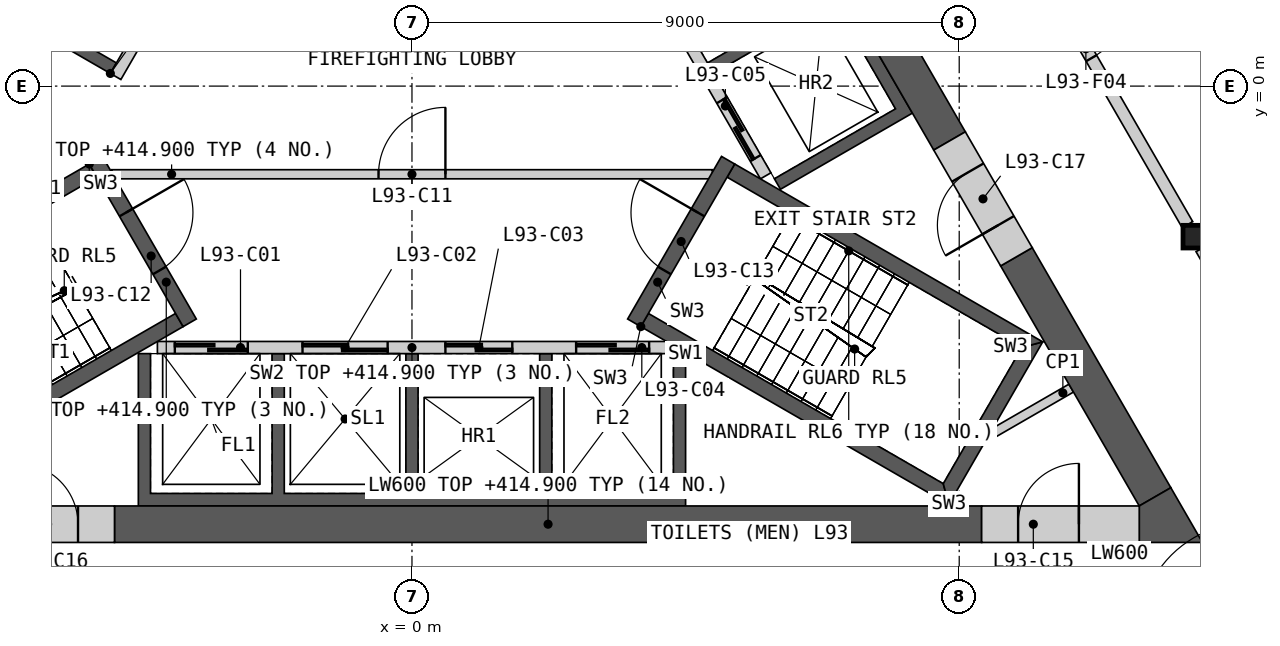
"""IFC4 building model, lengths in metres.
Left out: names, types, materials, properties, quantities, classifications, styles, units other than length and angle.
Written with IfcOpenShell. Run it as: python <this file> out.ifc"""

import sys

from ifc_helpers import new_model, si_unit, direction, frame, frame_2d, origin, origin_2d, place, context, subcontext, project, spatial, polyline, rectangle, i_section, outline, extrude, element, fill, save


model = new_model("IFC4")
c1 = context("Model", 3, precision=1e-05, world=origin(), true_north=direction((0.0, 1.0)))
c2 = subcontext(c1, "Body", "Model", "MODEL_VIEW")
j1 = project(units=[si_unit("LENGTHUNIT", "METRE"), si_unit("PLANEANGLEUNIT", "RADIAN")], contexts=[c1])
p1 = place(None, origin())
s1 = spatial("IfcSite", under=j1, at=p1, CompositionType="ELEMENT")
p2 = place(p1, origin())
s2 = spatial("IfcBuilding", under=s1, at=p2, CompositionType="ELEMENT")
p3 = place(p2, frame((0.0, 0.0, 405.2)))
s3 = spatial("IfcBuildingStorey", under=s2, at=p3, CompositionType="ELEMENT", Elevation=405.2)
p4 = place(p3, frame((12.868, -2.476, 0.0), z_axis=(0.0, 0.0, 1.0), x_axis=(1.0, 0.0, 0.0)))
e1 = element("IfcColumn", 1, at=p4, inside=s3, PredefinedType="COLUMN", context=c2, shape_type="SweptSolid", body=[
    extrude(i_section(OverallWidth=0.374, OverallDepth=0.372, WebThickness=0.016, FlangeThickness=0.026, at=origin_2d()), origin(), (0.0, 0.0, 1.0), 10.0),
])
p5 = place(p3, origin())
e2 = element("IfcWall", 2, at=p5, inside=s3, PredefinedType="SHEAR", context=c2, shape_type="SweptSolid", body=[
    extrude(outline(polyline([(4.5, -4.4), (4.5, -6.906), (-4.5, -6.906), (-4.5, -4.4), (-4.3, -4.4), (-4.3, -6.7), (-2.3, -6.7), (-2.3, -4.4), (-2.1, -4.4), (-2.1, -6.7), (-0.1, -6.7), (-0.1, -4.4), (0.1, -4.4), (0.1, -6.7), (2.1, -6.7), (2.1, -4.4), (2.3, -4.4), (2.3, -6.7), (4.3, -6.7), (4.3, -4.4), (4.5, -4.4)])), origin(), (0.0, 0.0, 1.0), 9.7),
])
p6 = place(p3, frame((-4.187, -4.3, 0.0), z_axis=(0.0, 0.0, 1.0), x_axis=(1.0, 0.0, 0.0)))
e3 = element("IfcWall", 3, at=p6, inside=s3, PredefinedType="SOLIDWALL", context=c2, shape_type="SweptSolid", body=[
    extrude(rectangle(XDim=8.373, YDim=0.2, at=frame_2d((4.187, 0.0))), origin(), (0.0, 0.0, 1.0), 9.7),
])
p7 = place(p6, frame((0.287, 0.0, 0.0)))
e4 = element("IfcOpeningElement", 4, at=p7, cuts=e3, PredefinedType="OPENING", context=c2, shape_type="SweptSolid", body=[
    extrude(rectangle(XDim=1.2, YDim=2.1, at=frame_2d((0.6, 1.05))), frame((0.0, 0.11, 0.0), z_axis=(0.0, -1.0, 0.0), x_axis=(1.0, 0.0, 0.0)), (0.0, 0.0, 1.0), 0.22),
])
p8 = place(p6, frame((2.387, 0.0, 0.0)))
e5 = element("IfcOpeningElement", 5, at=p8, cuts=e3, PredefinedType="OPENING", context=c2, shape_type="SweptSolid", body=[
    extrude(rectangle(XDim=1.4, YDim=2.1, at=frame_2d((0.7, 1.05))), frame((0.0, 0.11, 0.0), z_axis=(0.0, -1.0, 0.0), x_axis=(1.0, 0.0, 0.0)), (0.0, 0.0, 1.0), 0.22),
])
p9 = place(p6, frame((4.737, 0.0, 0.0)))
e6 = element("IfcOpeningElement", 6, at=p9, cuts=e3, PredefinedType="OPENING", context=c2, shape_type="SweptSolid", body=[
    extrude(rectangle(XDim=1.1, YDim=2.1, at=frame_2d((0.55, 1.05))), frame((0.0, 0.11, 0.0), z_axis=(0.0, -1.0, 0.0), x_axis=(1.0, 0.0, 0.0)), (0.0, 0.0, 1.0), 0.22),
])
p10 = place(p6, frame((6.887, 0.0, 0.0)))
e7 = element("IfcOpeningElement", 7, at=p10, cuts=e3, PredefinedType="OPENING", context=c2, shape_type="SweptSolid", body=[
    extrude(rectangle(XDim=1.2, YDim=2.1, at=frame_2d((0.6, 1.05))), frame((0.0, 0.11, 0.0), z_axis=(0.0, -1.0, 0.0), x_axis=(1.0, 0.0, 0.0)), (0.0, 0.0, 1.0), 0.22),
])
p11 = place(p3, origin())
e8 = element("IfcWall", 8, at=p11, inside=s3, PredefinedType="SHEAR", context=c2, shape_type="SweptSolid", body=[
    extrude(outline(polyline([(1.561, 6.097), (3.731, 7.35), (8.231, -0.444), (6.061, -1.697), (5.96, -1.524), (7.952, -0.374), (6.952, 1.358), (4.96, 0.208), (4.861, 0.381), (6.852, 1.531), (5.852, 3.263), (3.861, 2.113), (3.76, 2.287), (5.752, 3.437), (4.752, 5.169), (2.76, 4.019), (2.66, 4.192), (4.652, 5.342), (3.652, 7.074), (1.66, 5.924), (1.561, 6.097)])), origin(), (0.0, 0.0, 1.0), 9.7),
])
p12 = place(p3, frame((5.817, -1.476, 0.0), z_axis=(0.0, 0.0, 1.0), x_axis=(-0.500002616675, 0.866023893041, 0.0)))
e9 = element("IfcWall", 9, at=p12, inside=s3, PredefinedType="SOLIDWALL", context=c2, shape_type="SweptSolid", body=[
    extrude(rectangle(XDim=8.373, YDim=0.2, at=frame_2d((4.187, 0.0))), origin(), (0.0, 0.0, 1.0), 9.7),
])
p13 = place(p12, frame((0.337, 0.0, 0.0)))
e10 = element("IfcOpeningElement", 10, at=p13, cuts=e9, PredefinedType="OPENING", context=c2, shape_type="SweptSolid", body=[
    extrude(rectangle(XDim=1.1, YDim=2.1, at=frame_2d((0.55, 1.05))), frame((0.0, 0.11, 0.0), z_axis=(0.0, -1.0, 0.0), x_axis=(1.0, 0.0, 0.0)), (0.0, 0.0, 1.0), 0.22),
])
p14 = place(p12, frame((2.537, 0.0, 0.0)))
e11 = element("IfcOpeningElement", 11, at=p14, cuts=e9, PredefinedType="OPENING", context=c2, shape_type="SweptSolid", body=[
    extrude(rectangle(XDim=1.1, YDim=2.1, at=frame_2d((0.55, 1.05))), frame((0.0, 0.11, 0.0), z_axis=(0.0, -1.0, 0.0), x_axis=(1.0, 0.0, 0.0)), (0.0, 0.0, 1.0), 0.22),
])
p15 = place(p12, frame((4.737, 0.0, 0.0)))
e12 = element("IfcOpeningElement", 12, at=p15, cuts=e9, PredefinedType="OPENING", context=c2, shape_type="SweptSolid", body=[
    extrude(rectangle(XDim=1.1, YDim=2.1, at=frame_2d((0.55, 1.05))), frame((0.0, 0.11, 0.0), z_axis=(0.0, -1.0, 0.0), x_axis=(1.0, 0.0, 0.0)), (0.0, 0.0, 1.0), 0.22),
])
p16 = place(p12, frame((7.037, 0.0, 0.0)))
e13 = element("IfcOpeningElement", 13, at=p16, cuts=e9, PredefinedType="OPENING", context=c2, shape_type="SweptSolid", body=[
    extrude(rectangle(XDim=0.9, YDim=2.1, at=frame_2d((0.45, 1.05))), frame((0.0, 0.11, 0.0), z_axis=(0.0, -1.0, 0.0), x_axis=(1.0, 0.0, 0.0)), (0.0, 0.0, 1.0), 0.22),
])
p17 = place(p3, origin())
e14 = element("IfcWall", 14, at=p17, inside=s3, PredefinedType="SHEAR", context=c2, shape_type="SweptSolid", body=[
    extrude(outline(polyline([(-4.96, 0.208), (-7.131, 1.461), (-3.731, 7.35), (-1.561, 6.097), (-1.66, 5.924), (-3.652, 7.074), (-4.652, 5.342), (-2.66, 4.192), (-2.76, 4.019), (-4.752, 5.169), (-6.852, 1.531), (-4.861, 0.381), (-4.96, 0.208)])), origin(), (0.0, 0.0, 1.0), 9.7),
])
p18 = place(p3, frame((-1.631, 5.776, 0.0), z_axis=(0.0, 0.0, 1.0), x_axis=(-0.499992876559, -0.866029516466, 0.0)))
e15 = element("IfcWall", 15, at=p18, inside=s3, PredefinedType="SOLIDWALL", context=c2, shape_type="SweptSolid", body=[
    extrude(rectangle(XDim=6.486, YDim=0.2, at=frame_2d((3.243, 0.0))), origin(), (0.0, 0.0, 1.0), 9.7),
])
p19 = place(p18, frame((0.437, 0.0, 0.0)))
e16 = element("IfcOpeningElement", 16, at=p19, cuts=e15, PredefinedType="OPENING", context=c2, shape_type="SweptSolid", body=[
    extrude(rectangle(XDim=0.9, YDim=2.1, at=frame_2d((0.45, 1.05))), frame((0.0, 0.11, 0.0), z_axis=(0.0, -1.0, 0.0), x_axis=(1.0, 0.0, 0.0)), (0.0, 0.0, 1.0), 0.22),
])
p20 = place(p18, frame((3.737, 0.0, 0.0)))
e17 = element("IfcOpeningElement", 17, at=p20, cuts=e15, PredefinedType="OPENING", context=c2, shape_type="SweptSolid", body=[
    extrude(rectangle(XDim=0.9, YDim=2.1, at=frame_2d((0.45, 1.05))), frame((0.0, 0.11, 0.0), z_axis=(0.0, -1.0, 0.0), x_axis=(1.0, 0.0, 0.0)), (0.0, 0.0, 1.0), 0.22),
])
p21 = place(p3, frame((-4.941, -1.45, 0.0), z_axis=(0.0, 0.0, 1.0), x_axis=(1.0, 0.0, 0.0)))
e18 = element("IfcWall", 18, at=p21, inside=s3, PredefinedType="PARTITIONING", context=c2, shape_type="SweptSolid", body=[
    extrude(rectangle(XDim=9.882, YDim=0.15, at=frame_2d((4.941, 0.0))), origin(), (0.0, 0.0, 1.0), 9.7),
])
p22 = place(p21, frame((4.391, 0.0, 0.0)))
e19 = element("IfcOpeningElement", 19, at=p22, cuts=e18, PredefinedType="OPENING", context=c2, shape_type="SweptSolid", body=[
    extrude(rectangle(XDim=1.1, YDim=2.1, at=frame_2d((0.55, 1.05))), frame((0.0, 0.085, 0.0), z_axis=(0.0, -1.0, 0.0), x_axis=(1.0, 0.0, 0.0)), (0.0, 0.0, 1.0), 0.17),
])
p23 = place(p3, origin())
e20 = element("IfcWall", 20, at=p23, inside=s3, PredefinedType="SHEAR", context=c2, shape_type="SweptSolid", body=[
    extrude(outline(polyline([(-5.307, -1.281), (-10.374, -4.206), (-10.032, -4.298), (-5.182, -1.498), (-5.307, -1.281)])), origin(), (0.0, 0.0, 1.0), 9.7),
])
p24 = place(p3, origin())
e21 = element("IfcWall", 21, at=p24, inside=s3, PredefinedType="SHEAR", context=c2, shape_type="SweptSolid", body=[
    extrude(outline(polyline([(-8.738, -6.539), (-8.83, -6.881), (-3.763, -3.956), (-3.888, -3.739), (-8.738, -6.539)])), origin(), (0.0, 0.0, 1.0), 9.7),
])
p25 = place(p3, frame((-5.199, -1.219, 0.0), z_axis=(0.0, 0.0, 1.0), x_axis=(0.499982516597, -0.866035497597, 0.0)))
e22 = element("IfcWall", 22, at=p25, inside=s3, PredefinedType="SHEAR", context=c2, shape_type="SweptSolid", body=[
    extrude(rectangle(XDim=3.088, YDim=0.25, at=frame_2d((1.544, 0.0))), origin(), (0.0, 0.0, 1.0), 9.7),
])
p26 = place(p25, frame((0.994, 0.0, 0.0)))
e23 = element("IfcOpeningElement", 23, at=p26, cuts=e22, PredefinedType="OPENING", context=c2, shape_type="SweptSolid", body=[
    extrude(rectangle(XDim=1.1, YDim=2.1, at=frame_2d((0.55, 1.05))), frame((0.0, 0.135, 0.0), z_axis=(0.0, -1.0, 0.0), x_axis=(1.0, 0.0, 0.0)), (0.0, 0.0, 1.0), 0.27),
])
p27 = place(p3, origin())
e24 = element("IfcWall", 24, at=p27, inside=s3, PredefinedType="SHEAR", context=c2, shape_type="SweptSolid", body=[
    extrude(outline(polyline([(3.763, -3.956), (8.83, -6.881), (8.738, -6.539), (3.888, -3.739), (3.763, -3.956)])), origin(), (0.0, 0.0, 1.0), 9.7),
])
p28 = place(p3, origin())
e25 = element("IfcWall", 25, at=p28, inside=s3, PredefinedType="SHEAR", context=c2, shape_type="SweptSolid", body=[
    extrude(outline(polyline([(8.83, -6.881), (10.374, -4.206), (10.032, -4.298), (8.738, -6.539), (8.83, -6.881)])), origin(), (0.0, 0.0, 1.0), 9.7),
])
p29 = place(p3, origin())
e26 = element("IfcWall", 26, at=p29, inside=s3, PredefinedType="SHEAR", context=c2, shape_type="SweptSolid", body=[
    extrude(outline(polyline([(10.032, -4.298), (10.374, -4.206), (5.307, -1.281), (5.182, -1.498), (10.032, -4.298)])), origin(), (0.0, 0.0, 1.0), 9.7),
])
p30 = place(p3, frame((3.655, -3.893, 0.0), z_axis=(0.0, 0.0, 1.0), x_axis=(0.499982516597, 0.866035497597, 0.0)))
e27 = element("IfcWall", 27, at=p30, inside=s3, PredefinedType="SHEAR", context=c2, shape_type="SweptSolid", body=[
    extrude(rectangle(XDim=3.088, YDim=0.25, at=frame_2d((1.544, 0.0))), origin(), (0.0, 0.0, 1.0), 9.7),
])
p31 = place(p30, frame((0.994, 0.0, 0.0)))
e28 = element("IfcOpeningElement", 28, at=p31, cuts=e27, PredefinedType="OPENING", context=c2, shape_type="SweptSolid", body=[
    extrude(rectangle(XDim=1.1, YDim=2.1, at=frame_2d((0.55, 1.05))), frame((0.0, 0.135, 0.0), z_axis=(0.0, -1.0, 0.0), x_axis=(1.0, 0.0, 0.0)), (0.0, 0.0, 1.0), 0.27),
])
p32 = place(p3, frame((10.842, -4.967, 0.0), z_axis=(0.0, 0.0, 1.0), x_axis=(-0.866098216386, -0.499873863663, 0.0)))
e29 = element("IfcWall", 29, at=p32, inside=s3, PredefinedType="PARTITIONING", context=c2, shape_type="SweptSolid", body=[
    extrude(rectangle(XDim=1.582, YDim=0.15, at=frame_2d((0.791, 0.0))), origin(), (0.0, 0.0, 1.0), 9.7),
])
p33 = place(p3, frame((-4.892, -7.206, 0.0), z_axis=(0.0, 0.0, 1.0), x_axis=(1.0, 0.0, 0.0)))
e30 = element("IfcWall", 30, at=p33, inside=s3, PredefinedType="SHEAR", context=c2, shape_type="SweptSolid", body=[
    extrude(rectangle(XDim=14.261, YDim=0.6, at=frame_2d((7.13, 0.0))), origin(), (0.0, 0.0, 1.0), 9.7),
])
p34 = place(p3, frame((8.841, -0.902, 0.0), z_axis=(0.0, 0.0, 1.0), x_axis=(-0.499995618375, 0.866027933502, 0.0)))
e31 = element("IfcWall", 31, at=p34, inside=s3, PredefinedType="SHEAR", context=c2, shape_type="SweptSolid", body=[
    extrude(rectangle(XDim=14.571, YDim=0.6, at=frame_2d((7.285, 0.0))), origin(), (0.0, 0.0, 1.0), 9.7),
])
p35 = place(p3, frame((12.221, -6.756, 0.0), z_axis=(0.0, 0.0, 1.0), x_axis=(-0.500020646047, 0.866013483456, 0.0)))
e32 = element("IfcWall", 32, at=p35, inside=s3, PredefinedType="SHEAR", context=c2, shape_type="SweptSolid", body=[
    extrude(rectangle(XDim=4.559, YDim=0.6, at=frame_2d((2.28, 0.0))), origin(), (0.0, 0.0, 1.0), 9.7),
])
p36 = place(p3, origin())
e33 = element("IfcWall", 33, at=p36, inside=s3, PredefinedType="SHEAR", context=c2, shape_type="SweptSolid", body=[
    extrude(outline(polyline([(11.961, -7.506), (11.961, -6.906), (12.48, -6.606), (13.0, -7.506), (11.961, -7.506)])), origin(), (0.0, 0.0, 1.0), 9.7),
])
p37 = place(p3, frame((9.369, -7.206, 0.0), z_axis=(0.0, 0.0, 1.0), x_axis=(1.0, 0.0, 0.0)))
e34 = element("IfcWall", 34, at=p37, inside=s3, PredefinedType="SHEAR", context=c2, shape_type="SweptSolid", body=[
    extrude(rectangle(XDim=2.592, YDim=0.6, at=frame_2d((1.296, 0.0))), origin(), (0.0, 0.0, 1.0), 9.7),
])
p38 = place(p37, frame((0.6, 0.0, 0.0)))
e35 = element("IfcOpeningElement", 35, at=p38, cuts=e34, PredefinedType="OPENING", context=c2, shape_type="SweptSolid", body=[
    extrude(rectangle(XDim=1.0, YDim=2.1, at=frame_2d((0.5, 1.05))), frame((0.0, 0.31, 0.0), z_axis=(0.0, -1.0, 0.0), x_axis=(1.0, 0.0, 0.0)), (0.0, 0.0, 1.0), 0.62),
])
p39 = place(p3, frame((-7.092, -7.206, 0.0), z_axis=(0.0, 0.0, 1.0), x_axis=(1.0, 0.0, 0.0)))
e36 = element("IfcWall", 36, at=p39, inside=s3, PredefinedType="SHEAR", context=c2, shape_type="SweptSolid", body=[
    extrude(rectangle(XDim=2.2, YDim=0.6, at=frame_2d((1.1, 0.0))), origin(), (0.0, 0.0, 1.0), 9.7),
])
p40 = place(p39, frame((0.6, 0.0, 0.0)))
e37 = element("IfcOpeningElement", 37, at=p40, cuts=e36, PredefinedType="OPENING", context=c2, shape_type="SweptSolid", body=[
    extrude(rectangle(XDim=1.0, YDim=2.1, at=frame_2d((0.5, 1.05))), frame((0.0, 0.31, 0.0), z_axis=(0.0, -1.0, 0.0), x_axis=(1.0, 0.0, 0.0)), (0.0, 0.0, 1.0), 0.62),
])
p41 = place(p3, frame((9.941, -2.807, 0.0), z_axis=(0.0, 0.0, 1.0), x_axis=(-0.499994660107, 0.866028486751, 0.0)))
e38 = element("IfcWall", 38, at=p41, inside=s3, PredefinedType="SHEAR", context=c2, shape_type="SweptSolid", body=[
    extrude(rectangle(XDim=2.2, YDim=0.6, at=frame_2d((1.1, 0.0))), origin(), (0.0, 0.0, 1.0), 9.7),
])
p42 = place(p41, frame((0.6, 0.0, 0.0)))
e39 = element("IfcOpeningElement", 39, at=p42, cuts=e38, PredefinedType="OPENING", context=c2, shape_type="SweptSolid", body=[
    extrude(rectangle(XDim=1.0, YDim=2.1, at=frame_2d((0.5, 1.05))), frame((0.0, 0.31, 0.0), z_axis=(0.0, -1.0, 0.0), x_axis=(1.0, 0.0, 0.0)), (0.0, 0.0, 1.0), 0.62),
])
p43 = place(p3, frame((8.692, 4.756, 0.0), z_axis=(0.0, 0.0, 1.0), x_axis=(0.500001682468, -0.866024432409, 0.0)))
e40 = element("IfcWall", 40, at=p43, inside=s3, PredefinedType="PARTITIONING", context=c2, shape_type="SweptSolid", body=[
    extrude(rectangle(XDim=8.124, YDim=0.2, at=frame_2d((4.062, 0.0))), origin(), (0.0, 0.0, 1.0), 9.7),
])
p44 = place(p43, frame((3.162, 0.0, 0.0)))
e41 = element("IfcOpeningElement", 41, at=p44, cuts=e40, PredefinedType="OPENING", context=c2, shape_type="SweptSolid", body=[
    extrude(rectangle(XDim=1.8, YDim=2.1, at=frame_2d((0.9, 1.05))), frame((0.0, 0.11, 0.0), z_axis=(0.0, -1.0, 0.0), x_axis=(1.0, 0.0, 0.0)), (0.0, 0.0, 1.0), 0.22),
])
p45 = place(p3, frame((12.981, -2.673, 0.0), z_axis=(0.0, 0.0, 1.0), x_axis=(0.499974648164, -0.866040040179, 0.0)))
e42 = element("IfcWall", 42, at=p45, inside=s3, PredefinedType="PARTITIONING", context=c2, shape_type="SweptSolid", body=[
    extrude(rectangle(XDim=4.525, YDim=0.2, at=frame_2d((2.263, 0.0))), origin(), (0.0, 0.0, 1.0), 9.7),
])
p46 = place(p7, origin())
e43 = element("IfcDoor", 43, at=p46, inside=s3, OperationType="SLIDING_TO_LEFT", PredefinedType="DOOR", context=c2, shape_type="SweptSolid", body=[
    extrude(rectangle(XDim=1.2, YDim=2.1, at=frame_2d((0.6, 1.05))), frame((0.0, 0.025, 0.0), z_axis=(0.0, -1.0, 0.0), x_axis=(1.0, 0.0, 0.0)), (0.0, 0.0, 1.0), 0.05),
])
fill(e4, e43)
p47 = place(p8, origin())
e44 = element("IfcDoor", 44, at=p47, inside=s3, OperationType="SLIDING_TO_LEFT", PredefinedType="DOOR", context=c2, shape_type="SweptSolid", body=[
    extrude(rectangle(XDim=1.4, YDim=2.1, at=frame_2d((0.7, 1.05))), frame((0.0, 0.025, 0.0), z_axis=(0.0, -1.0, 0.0), x_axis=(1.0, 0.0, 0.0)), (0.0, 0.0, 1.0), 0.05),
])
fill(e5, e44)
p48 = place(p9, origin())
e45 = element("IfcDoor", 45, at=p48, inside=s3, OperationType="SLIDING_TO_LEFT", PredefinedType="DOOR", context=c2, shape_type="SweptSolid", body=[
    extrude(rectangle(XDim=1.1, YDim=2.1, at=frame_2d((0.55, 1.05))), frame((0.0, 0.025, 0.0), z_axis=(0.0, -1.0, 0.0), x_axis=(1.0, 0.0, 0.0)), (0.0, 0.0, 1.0), 0.05),
])
fill(e6, e45)
p49 = place(p10, origin())
e46 = element("IfcDoor", 46, at=p49, inside=s3, OperationType="SLIDING_TO_LEFT", PredefinedType="DOOR", context=c2, shape_type="SweptSolid", body=[
    extrude(rectangle(XDim=1.2, YDim=2.1, at=frame_2d((0.6, 1.05))), frame((0.0, 0.025, 0.0), z_axis=(0.0, -1.0, 0.0), x_axis=(1.0, 0.0, 0.0)), (0.0, 0.0, 1.0), 0.05),
])
fill(e7, e46)
p50 = place(p13, origin())
e47 = element("IfcDoor", 47, at=p50, inside=s3, OperationType="SLIDING_TO_LEFT", PredefinedType="DOOR", context=c2, shape_type="SweptSolid", body=[
    extrude(rectangle(XDim=1.1, YDim=2.1, at=frame_2d((0.55, 1.05))), frame((0.0, 0.025, 0.0), z_axis=(0.0, -1.0, 0.0), x_axis=(1.0, 0.0, 0.0)), (0.0, 0.0, 1.0), 0.05),
])
fill(e10, e47)
p51 = place(p22, origin())
e48 = element("IfcDoor", 48, at=p51, inside=s3, OperationType="SINGLE_SWING_RIGHT", PredefinedType="DOOR", context=c2, shape_type="SweptSolid", body=[
    extrude(rectangle(XDim=1.1, YDim=2.1, at=frame_2d((0.55, 1.05))), frame((0.0, 0.025, 0.0), z_axis=(0.0, -1.0, 0.0), x_axis=(1.0, 0.0, 0.0)), (0.0, 0.0, 1.0), 0.05),
])
fill(e19, e48)
p52 = place(p26, origin())
e49 = element("IfcDoor", 49, at=p52, inside=s3, OperationType="SINGLE_SWING_LEFT", PredefinedType="DOOR", context=c2, shape_type="SweptSolid", body=[
    extrude(rectangle(XDim=1.1, YDim=2.1, at=frame_2d((0.55, 1.05))), frame((0.0, 0.025, 0.0), z_axis=(0.0, -1.0, 0.0), x_axis=(1.0, 0.0, 0.0)), (0.0, 0.0, 1.0), 0.05),
])
fill(e23, e49)
p53 = place(p31, origin())
e50 = element("IfcDoor", 50, at=p53, inside=s3, OperationType="SINGLE_SWING_RIGHT", PredefinedType="DOOR", context=c2, shape_type="SweptSolid", body=[
    extrude(rectangle(XDim=1.1, YDim=2.1, at=frame_2d((0.55, 1.05))), frame((0.0, 0.025, 0.0), z_axis=(0.0, -1.0, 0.0), x_axis=(1.0, 0.0, 0.0)), (0.0, 0.0, 1.0), 0.05),
])
fill(e28, e50)
p54 = place(p38, origin())
e51 = element("IfcDoor", 51, at=p54, inside=s3, OperationType="SINGLE_SWING_RIGHT", PredefinedType="DOOR", context=c2, shape_type="SweptSolid", body=[
    extrude(rectangle(XDim=1.0, YDim=2.1, at=frame_2d((0.5, 1.05))), frame((0.0, 0.055, 0.0), z_axis=(0.0, -1.0, 0.0), x_axis=(1.0, 0.0, 0.0)), (0.0, 0.0, 1.0), 0.05),
])
fill(e35, e51)
p55 = place(p40, origin())
e52 = element("IfcDoor", 52, at=p55, inside=s3, OperationType="SINGLE_SWING_LEFT", PredefinedType="DOOR", context=c2, shape_type="SweptSolid", body=[
    extrude(rectangle(XDim=1.0, YDim=2.1, at=frame_2d((0.5, 1.05))), frame((0.0, 0.055, 0.0), z_axis=(0.0, -1.0, 0.0), x_axis=(1.0, 0.0, 0.0)), (0.0, 0.0, 1.0), 0.05),
])
fill(e37, e52)
p56 = place(p42, origin())
e53 = element("IfcDoor", 53, at=p56, inside=s3, OperationType="SINGLE_SWING_LEFT", PredefinedType="DOOR", context=c2, shape_type="SweptSolid", body=[
    extrude(rectangle(XDim=1.0, YDim=2.1, at=frame_2d((0.5, 1.05))), frame((0.0, 0.055, 0.0), z_axis=(0.0, -1.0, 0.0), x_axis=(1.0, 0.0, 0.0)), (0.0, 0.0, 1.0), 0.05),
])
fill(e39, e53)
p57 = place(p44, origin())
e54 = element("IfcDoor", 54, at=p57, inside=s3, OperationType="DOUBLE_DOOR_SINGLE_SWING", PredefinedType="DOOR", context=c2, shape_type="SweptSolid", body=[
    extrude(rectangle(XDim=1.8, YDim=2.1, at=frame_2d((0.9, 1.05))), frame((0.0, 0.025, 0.0), z_axis=(0.0, -1.0, 0.0), x_axis=(1.0, 0.0, 0.0)), (0.0, 0.0, 1.0), 0.05),
])
fill(e41, e54)
save(model, sys.argv[1])
